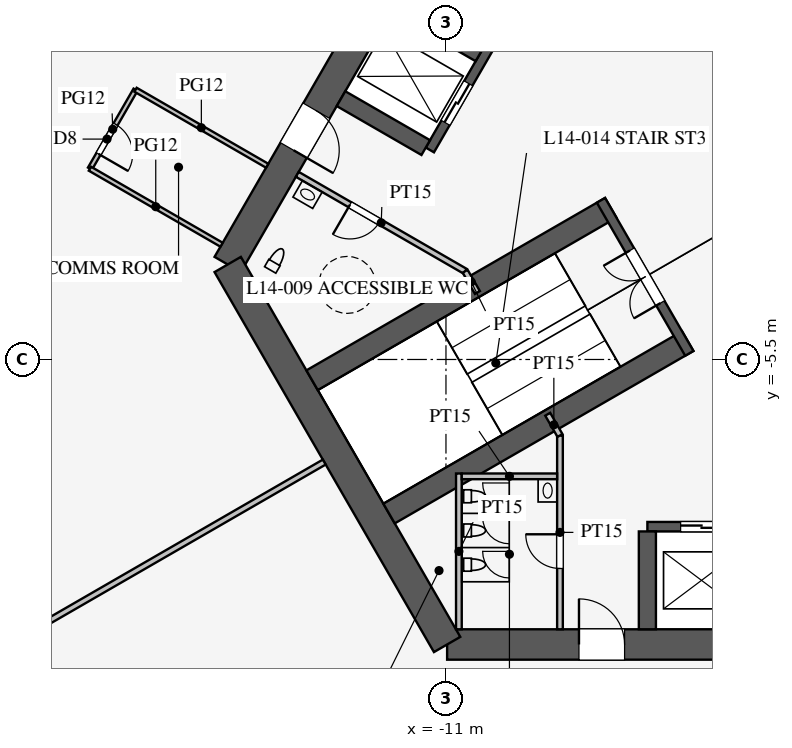
"""IFC4 building model, lengths in metres.
Left out: names, types, materials, properties, quantities, classifications, styles, units other than length and angle.
Written with IfcOpenShell. Run it as: python <this file> out.ifc"""

import sys

from ifc_helpers import new_model, si_unit, direction, frame, frame_2d, origin, place, context, subcontext, project, spatial, rectangle, extrude, element, fill, save


model = new_model("IFC4")
c1 = context("Model", 3, precision=1e-05, world=origin(), true_north=direction((0.0, 1.0)))
c2 = subcontext(c1, "Body", "Model", "MODEL_VIEW")
j1 = project(units=[si_unit("LENGTHUNIT", "METRE"), si_unit("PLANEANGLEUNIT", "RADIAN")], contexts=[c1])
p1 = place(None, origin())
s1 = spatial("IfcSite", under=j1, at=p1, CompositionType="ELEMENT")
p2 = place(p1, origin())
s2 = spatial("IfcBuilding", under=s1, at=p2, CompositionType="ELEMENT")
p3 = place(p2, frame((0.0, 0.0, 62.7)))
s3 = spatial("IfcBuildingStorey", under=s2, at=p3, CompositionType="ELEMENT", Elevation=62.7)
p4 = place(p3, frame((-10.97, -13.0, 0.0), z_axis=(0.0, 0.0, 1.0), x_axis=(1.0, 0.0, 0.0)))
e1 = element("IfcWall", 1, at=p4, inside=s3, PredefinedType="SHEAR", context=c2, shape_type="SweptSolid", body=[
    extrude(rectangle(XDim=21.939, YDim=0.8, at=frame_2d((10.97, 0.0))), origin(), (0.0, 0.0, 1.0), 4.2),
])
p5 = place(p4, frame((17.27, 0.0, 0.0)))
e2 = element("IfcOpeningElement", 2, at=p5, cuts=e1, PredefinedType="OPENING", context=c2, shape_type="SweptSolid", body=[
    extrude(rectangle(XDim=1.2, YDim=2.1, at=frame_2d((0.6, 1.05))), frame((0.0, 0.41, 0.0), z_axis=(0.0, -1.0, 0.0), x_axis=(1.0, 0.0, 0.0)), (0.0, 0.0, 1.0), 0.82),
])
p6 = place(p4, frame((3.47, 0.0, 0.0)))
e3 = element("IfcOpeningElement", 3, at=p6, cuts=e1, PredefinedType="OPENING", context=c2, shape_type="SweptSolid", body=[
    extrude(rectangle(XDim=1.2, YDim=2.1, at=frame_2d((0.6, 1.05))), frame((0.0, 0.41, 0.0), z_axis=(0.0, -1.0, 0.0), x_axis=(1.0, 0.0, 0.0)), (0.0, 0.0, 1.0), 0.82),
])
p7 = place(p3, frame((-5.773, 16.0, 0.0), z_axis=(0.0, 0.0, 1.0), x_axis=(-0.500002442456, -0.866023993627, 0.0)))
e4 = element("IfcWall", 4, at=p7, inside=s3, PredefinedType="SHEAR", context=c2, shape_type="SweptSolid", body=[
    extrude(rectangle(XDim=21.939, YDim=0.8, at=frame_2d((10.97, 0.0))), origin(), (0.0, 0.0, 1.0), 4.2),
])
p8 = place(p7, frame((17.27, 0.0, 0.0)))
e5 = element("IfcOpeningElement", 5, at=p8, cuts=e4, PredefinedType="OPENING", context=c2, shape_type="SweptSolid", body=[
    extrude(rectangle(XDim=1.2, YDim=2.1, at=frame_2d((0.6, 1.05))), frame((0.0, 0.41, 0.0), z_axis=(0.0, -1.0, 0.0), x_axis=(1.0, 0.0, 0.0)), (0.0, 0.0, 1.0), 0.82),
])
p9 = place(p7, frame((3.47, 0.0, 0.0)))
e6 = element("IfcOpeningElement", 6, at=p9, cuts=e4, PredefinedType="OPENING", context=c2, shape_type="SweptSolid", body=[
    extrude(rectangle(XDim=1.2, YDim=2.1, at=frame_2d((0.6, 1.05))), frame((0.0, 0.41, 0.0), z_axis=(0.0, -1.0, 0.0), x_axis=(1.0, 0.0, 0.0)), (0.0, 0.0, 1.0), 0.82),
])
p10 = place(p3, frame((-16.743, -3.0, 0.0), z_axis=(0.0, 0.0, 1.0), x_axis=(0.499995765644, -0.866027848477, 0.0)))
e7 = element("IfcWall", 7, at=p10, inside=s3, PredefinedType="SHEAR", context=c2, shape_type="SweptSolid", body=[
    extrude(rectangle(XDim=11.547, YDim=0.8, at=frame_2d((5.773, 0.0))), origin(), (0.0, 0.0, 1.0), 4.2),
])
p11 = place(p3, frame((-5.7, -9.9, 0.0), z_axis=(0.0, 0.0, 1.0), x_axis=(1.0, 0.0, 0.0)))
e8 = element("IfcWall", 8, at=p11, inside=s3, PredefinedType="SHEAR", context=c2, shape_type="SweptSolid", body=[
    extrude(rectangle(XDim=11.4, YDim=0.25, at=frame_2d((5.7, 0.0))), origin(), (0.0, 0.0, 1.0), 4.2),
])
p12 = place(p11, frame((0.875, 0.0, 0.0)))
e9 = element("IfcOpeningElement", 9, at=p12, cuts=e8, PredefinedType="OPENING", context=c2, shape_type="SweptSolid", body=[
    extrude(rectangle(XDim=1.1, YDim=2.2, at=frame_2d((0.55, 1.1))), frame((0.0, 0.135, 0.0), z_axis=(0.0, -1.0, 0.0), x_axis=(1.0, 0.0, 0.0)), (0.0, 0.0, 1.0), 0.27),
])
p13 = place(p11, frame((3.725, 0.0, 0.0)))
e10 = element("IfcOpeningElement", 10, at=p13, cuts=e8, PredefinedType="OPENING", context=c2, shape_type="SweptSolid", body=[
    extrude(rectangle(XDim=1.1, YDim=2.2, at=frame_2d((0.55, 1.1))), frame((0.0, 0.135, 0.0), z_axis=(0.0, -1.0, 0.0), x_axis=(1.0, 0.0, 0.0)), (0.0, 0.0, 1.0), 0.27),
])
p14 = place(p11, frame((6.575, 0.0, 0.0)))
e11 = element("IfcOpeningElement", 11, at=p14, cuts=e8, PredefinedType="OPENING", context=c2, shape_type="SweptSolid", body=[
    extrude(rectangle(XDim=1.1, YDim=2.2, at=frame_2d((0.55, 1.1))), frame((0.0, 0.135, 0.0), z_axis=(0.0, -1.0, 0.0), x_axis=(1.0, 0.0, 0.0)), (0.0, 0.0, 1.0), 0.27),
])
p15 = place(p11, frame((9.425, 0.0, 0.0)))
e12 = element("IfcOpeningElement", 12, at=p15, cuts=e8, PredefinedType="OPENING", context=c2, shape_type="SweptSolid", body=[
    extrude(rectangle(XDim=1.1, YDim=2.2, at=frame_2d((0.55, 1.1))), frame((0.0, 0.135, 0.0), z_axis=(0.0, -1.0, 0.0), x_axis=(1.0, 0.0, 0.0)), (0.0, 0.0, 1.0), 0.27),
])
p16 = place(p3, frame((-5.7, -10.025, 0.0), z_axis=(0.0, 0.0, 1.0), x_axis=(0.0, -1.0, 0.0)))
e13 = element("IfcWall", 13, at=p16, inside=s3, PredefinedType="SHEAR", context=c2, shape_type="SweptSolid", body=[
    extrude(rectangle(XDim=2.575, YDim=0.45, at=frame_2d((1.288, 0.0))), origin(), (0.0, 0.0, 1.0), 4.2),
])
p17 = place(p3, frame((-5.724, 9.886, 0.0), z_axis=(0.0, 0.0, 1.0), x_axis=(-0.500001763848, -0.866024385424, 0.0)))
e14 = element("IfcWall", 14, at=p17, inside=s3, PredefinedType="SHEAR", context=c2, shape_type="SweptSolid", body=[
    extrude(rectangle(XDim=11.4, YDim=0.25, at=frame_2d((5.7, 0.0))), origin(), (0.0, 0.0, 1.0), 4.2),
])
p18 = place(p17, frame((6.525, 0.0, 0.0)))
e15 = element("IfcOpeningElement", 15, at=p18, cuts=e14, PredefinedType="OPENING", context=c2, shape_type="SweptSolid", body=[
    extrude(rectangle(XDim=1.2, YDim=2.2, at=frame_2d((0.6, 1.1))), frame((0.0, 0.135, 0.0), z_axis=(0.0, -1.0, 0.0), x_axis=(1.0, 0.0, 0.0)), (0.0, 0.0, 1.0), 0.27),
])
p19 = place(p17, frame((9.375, 0.0, 0.0)))
e16 = element("IfcOpeningElement", 16, at=p19, cuts=e14, PredefinedType="OPENING", context=c2, shape_type="SweptSolid", body=[
    extrude(rectangle(XDim=1.2, YDim=2.2, at=frame_2d((0.6, 1.1))), frame((0.0, 0.135, 0.0), z_axis=(0.0, -1.0, 0.0), x_axis=(1.0, 0.0, 0.0)), (0.0, 0.0, 1.0), 0.27),
])
for number, where, z_axis, x_axis in (
    (17, (-10.107, 2.544, 0.0), (0.0, 0.0, 1.0), (-0.866, 0.5, 0.0)),
    (18, (-11.532, 0.076, 0.0), (0.0, 0.0, 1.0), (-0.866, 0.5, 0.0)),
):
    element("IfcWall", number, at=place(p3, frame(where, z_axis=z_axis, x_axis=x_axis)), inside=s3, PredefinedType="SHEAR", context=c2, shape_type="SweptSolid", body=[
        extrude(rectangle(XDim=2.575, YDim=0.45, at=frame_2d((1.288, 0.0))), origin(), (0.0, 0.0, 1.0), 4.2),
    ])
for number, where, z_axis, x_axis in (
    (19, (-6.663, -1.509, 0.0), (0.0, 0.0, 1.0), (-0.866, -0.5, 0.0)),
    (20, (-4.638, -5.016, 0.0), (0.0, 0.0, 1.0), (-0.866, -0.5, 0.0)),
):
    element("IfcWall", number, at=place(p3, frame(where, z_axis=z_axis, x_axis=x_axis)), inside=s3, PredefinedType="SHEAR", context=c2, shape_type="SweptSolid", body=[
        extrude(rectangle(XDim=9.075, YDim=0.6, at=frame_2d((4.538, 0.0))), origin(), (0.0, 0.0, 1.0), 4.2),
    ])
p20 = place(p3, frame((-6.922, -1.312, 0.0), z_axis=(0.0, 0.0, 1.0), x_axis=(0.499984536904, -0.866034331223, 0.0)))
e21 = element("IfcWall", 21, at=p20, inside=s3, PredefinedType="SHEAR", context=c2, shape_type="SweptSolid", body=[
    extrude(rectangle(XDim=4.65, YDim=0.25, at=frame_2d((2.325, 0.0))), origin(), (0.0, 0.0, 1.0), 4.2),
])
p21 = place(p20, frame((1.525, 0.0, 0.0)))
e22 = element("IfcOpeningElement", 22, at=p21, cuts=e21, PredefinedType="OPENING", context=c2, shape_type="SweptSolid", body=[
    extrude(rectangle(XDim=1.6, YDim=2.1, at=frame_2d((0.8, 1.05))), frame((0.0, 0.135, 0.0), z_axis=(0.0, -1.0, 0.0), x_axis=(1.0, 0.0, 0.0)), (0.0, 0.0, 1.0), 0.27),
])
p22 = place(p3, frame((-8.0, -7.5, 0.0), z_axis=(0.0, 0.0, 1.0), x_axis=(0.0, -1.0, 0.0)))
e23 = element("IfcWall", 23, at=p22, inside=s3, PredefinedType="PARTITIONING", context=c2, shape_type="SweptSolid", body=[
    extrude(rectangle(XDim=5.1, YDim=0.15, at=frame_2d((2.55, 0.0))), origin(), (0.0, 0.0, 1.0), 4.0),
])
p23 = place(p22, frame((2.6, 0.0, 0.0)))
e24 = element("IfcOpeningElement", 24, at=p23, cuts=e23, PredefinedType="OPENING", context=c2, shape_type="SweptSolid", body=[
    extrude(rectangle(XDim=0.9, YDim=2.1, at=frame_2d((0.45, 1.05))), frame((0.0, 0.085, 0.0), z_axis=(0.0, -1.0, 0.0), x_axis=(1.0, 0.0, 0.0)), (0.0, 0.0, 1.0), 0.17),
])
p24 = place(p3, frame((-10.495, -3.178, 0.0), z_axis=(0.0, 0.0, 1.0), x_axis=(-0.86602216432, 0.500005610874, 0.0)))
e25 = element("IfcWall", 25, at=p24, inside=s3, PredefinedType="PARTITIONING", context=c2, shape_type="SweptSolid", body=[
    extrude(rectangle(XDim=5.1, YDim=0.15, at=frame_2d((2.55, 0.0))), origin(), (0.0, 0.0, 1.0), 4.0),
])
p25 = place(p24, frame((2.6, 0.0, 0.0)))
e26 = element("IfcOpeningElement", 26, at=p25, cuts=e25, PredefinedType="OPENING", context=c2, shape_type="SweptSolid", body=[
    extrude(rectangle(XDim=0.9, YDim=2.1, at=frame_2d((0.45, 1.05))), frame((0.0, 0.085, 0.0), z_axis=(0.0, -1.0, 0.0), x_axis=(1.0, 0.0, 0.0)), (0.0, 0.0, 1.0), 0.17),
])
for number, where, z_axis, x_axis in (
    (27, (-10.495, -3.178, 0.0), (0.0, 0.0, 1.0), (0.5, -0.866, 0.0)),
    (28, (-8.0, -7.5, 0.0), (0.0, 0.0, 1.0), (-0.5, 0.866, 0.0)),
):
    element("IfcWall", number, at=place(p3, frame(where, z_axis=z_axis, x_axis=x_axis)), inside=s3, PredefinedType="PARTITIONING", context=c2, shape_type="SweptSolid", body=[
        extrude(rectangle(XDim=0.645, YDim=0.15, at=frame_2d((0.323, 0.0))), origin(), (0.0, 0.0, 1.0), 4.0),
    ])
p26 = place(p3, frame((-10.66, -8.5, 0.0), z_axis=(0.0, 0.0, 1.0), x_axis=(0.0, -1.0, 0.0)))
e29 = element("IfcWall", 29, at=p26, inside=s3, PredefinedType="PARTITIONING", context=c2, shape_type="SweptSolid", body=[
    extrude(rectangle(XDim=4.1, YDim=0.15, at=frame_2d((2.05, 0.0))), origin(), (0.0, 0.0, 1.0), 4.0),
])
p27 = place(p3, frame((-8.075, -8.575, 0.0), z_axis=(0.0, 0.0, 1.0), x_axis=(-1.0, 0.0, 0.0)))
e30 = element("IfcWall", 30, at=p27, inside=s3, PredefinedType="PARTITIONING", context=c2, shape_type="SweptSolid", body=[
    extrude(rectangle(XDim=2.51, YDim=0.15, at=frame_2d((1.255, 0.0))), origin(), (0.0, 0.0, 1.0), 4.0),
])
p28 = place(p3, frame((-14.203, -8.2, 0.0), z_axis=(0.0, 0.0, 1.0), x_axis=(-0.866024965723, -0.500000758745, 0.0)))
e31 = element("IfcWall", 31, at=p28, inside=s3, PredefinedType="PARTITIONING", context=c2, shape_type="SweptSolid", body=[
    extrude(rectangle(XDim=18.25, YDim=0.15, at=frame_2d((9.125, 0.0))), origin(), (0.0, 0.0, 1.0), 2.3),
])
p29 = place(p3, frame((-19.169, 1.599, 0.0), z_axis=(0.0, 0.0, 1.0), x_axis=(-0.499957262057, -0.866050077142, 0.0)))
e32 = element("IfcWall", 32, at=p29, inside=s3, PredefinedType="PARTITIONING", context=c2, shape_type="SweptSolid", body=[
    extrude(rectangle(XDim=2.4, YDim=0.12, at=frame_2d((1.2, 0.0))), origin(), (0.0, 0.0, 1.0), 2.9),
])
p30 = place(p29, frame((1.05, 0.0, 0.15)))
e33 = element("IfcOpeningElement", 33, at=p30, cuts=e32, PredefinedType="OPENING", context=c2, shape_type="SweptSolid", body=[
    extrude(rectangle(XDim=0.9, YDim=2.1, at=frame_2d((0.45, 1.05))), frame((0.0, 0.07, 0.0), z_axis=(0.0, -1.0, 0.0), x_axis=(1.0, 0.0, 0.0)), (0.0, 0.0, 1.0), 0.14),
])
for number, where, z_axis, x_axis in (
    (34, (-16.905, -2.48, 0.0), (0.0, 0.0, 1.0), (-0.866, 0.5, 0.0)),
    (35, (-15.705, -0.401, 0.0), (0.0, 0.0, 1.0), (-0.866, 0.5, 0.0)),
):
    element("IfcWall", number, at=place(p3, frame(where, z_axis=z_axis, x_axis=x_axis)), inside=s3, PredefinedType="PARTITIONING", context=c2, shape_type="SweptSolid", body=[
        extrude(rectangle(XDim=4.0, YDim=0.12, at=frame_2d((2.0, 0.0))), origin(), (0.0, 0.0, 1.0), 2.9),
    ])
p31 = place(p23, frame((0.9, 0.0, 0.0), z_axis=(0.0, 0.0, 1.0), x_axis=(-1.0, 0.0, 0.0)))
e36 = element("IfcDoor", 36, at=p31, inside=s3, OperationType="SINGLE_SWING_RIGHT", PredefinedType="DOOR", context=c2, shape_type="SweptSolid", body=[
    extrude(rectangle(XDim=0.9, YDim=2.1, at=frame_2d((0.45, 1.05))), frame((0.0, 0.025, 0.0), z_axis=(0.0, -1.0, 0.0), x_axis=(1.0, 0.0, 0.0)), (0.0, 0.0, 1.0), 0.05),
])
fill(e24, e36)
p32 = place(p25, origin())
e37 = element("IfcDoor", 37, at=p32, inside=s3, OperationType="SINGLE_SWING_RIGHT", PredefinedType="DOOR", context=c2, shape_type="SweptSolid", body=[
    extrude(rectangle(XDim=0.9, YDim=2.1, at=frame_2d((0.45, 1.05))), frame((0.0, 0.025, 0.0), z_axis=(0.0, -1.0, 0.0), x_axis=(1.0, 0.0, 0.0)), (0.0, 0.0, 1.0), 0.05),
])
fill(e26, e37)
p33 = place(p21, frame((1.6, 0.0, 0.0), z_axis=(0.0, 0.0, 1.0), x_axis=(-1.0, 0.0, 0.0)))
e38 = element("IfcDoor", 38, at=p33, inside=s3, OperationType="DOUBLE_DOOR_SINGLE_SWING", PredefinedType="DOOR", context=c2, shape_type="SweptSolid", body=[
    extrude(rectangle(XDim=1.6, YDim=2.1, at=frame_2d((0.8, 1.05))), frame((0.0, 0.025, 0.0), z_axis=(0.0, -1.0, 0.0), x_axis=(1.0, 0.0, 0.0)), (0.0, 0.0, 1.0), 0.05),
])
fill(e22, e38)
p34 = place(p6, origin())
e39 = element("IfcDoor", 39, at=p34, inside=s3, OperationType="SINGLE_SWING_LEFT", PredefinedType="DOOR", context=c2, shape_type="SweptSolid", body=[
    extrude(rectangle(XDim=1.2, YDim=2.1, at=frame_2d((0.6, 1.05))), frame((0.0, 0.025, 0.0), z_axis=(0.0, -1.0, 0.0), x_axis=(1.0, 0.0, 0.0)), (0.0, 0.0, 1.0), 0.05),
])
fill(e3, e39)
p35 = place(p8, origin())
e40 = element("IfcDoor", 40, at=p35, inside=s3, OperationType="SINGLE_SWING_RIGHT", PredefinedType="DOOR", context=c2, shape_type="SweptSolid", body=[
    extrude(rectangle(XDim=1.2, YDim=2.1, at=frame_2d((0.6, 1.05))), frame((0.0, 0.025, 0.0), z_axis=(0.0, -1.0, 0.0), x_axis=(1.0, 0.0, 0.0)), (0.0, 0.0, 1.0), 0.05),
])
fill(e5, e40)
p36 = place(p30, origin())
e41 = element("IfcDoor", 41, at=p36, inside=s3, OperationType="SINGLE_SWING_RIGHT", PredefinedType="DOOR", context=c2, shape_type="SweptSolid", body=[
    extrude(rectangle(XDim=0.9, YDim=2.1, at=frame_2d((0.45, 1.05))), frame((0.0, 0.025, 0.0), z_axis=(0.0, -1.0, 0.0), x_axis=(1.0, 0.0, 0.0)), (0.0, 0.0, 1.0), 0.05),
])
fill(e33, e41)
p37 = place(p12, origin())
e42 = element("IfcDoor", 42, at=p37, inside=s3, OperationType="DOUBLE_DOOR_SLIDING", PredefinedType="DOOR", context=c2, shape_type="SweptSolid", body=[
    extrude(rectangle(XDim=1.1, YDim=2.2, at=frame_2d((0.55, 1.1))), frame((0.0, 0.025, 0.0), z_axis=(0.0, -1.0, 0.0), x_axis=(1.0, 0.0, 0.0)), (0.0, 0.0, 1.0), 0.05),
])
fill(e9, e42)
p38 = place(p19, origin())
e43 = element("IfcDoor", 43, at=p38, inside=s3, OperationType="DOUBLE_DOOR_SLIDING", PredefinedType="DOOR", context=c2, shape_type="SweptSolid", body=[
    extrude(rectangle(XDim=1.2, YDim=2.2, at=frame_2d((0.6, 1.1))), frame((0.0, 0.025, 0.0), z_axis=(0.0, -1.0, 0.0), x_axis=(1.0, 0.0, 0.0)), (0.0, 0.0, 1.0), 0.05),
])
fill(e16, e43)
save(model, sys.argv[1])
